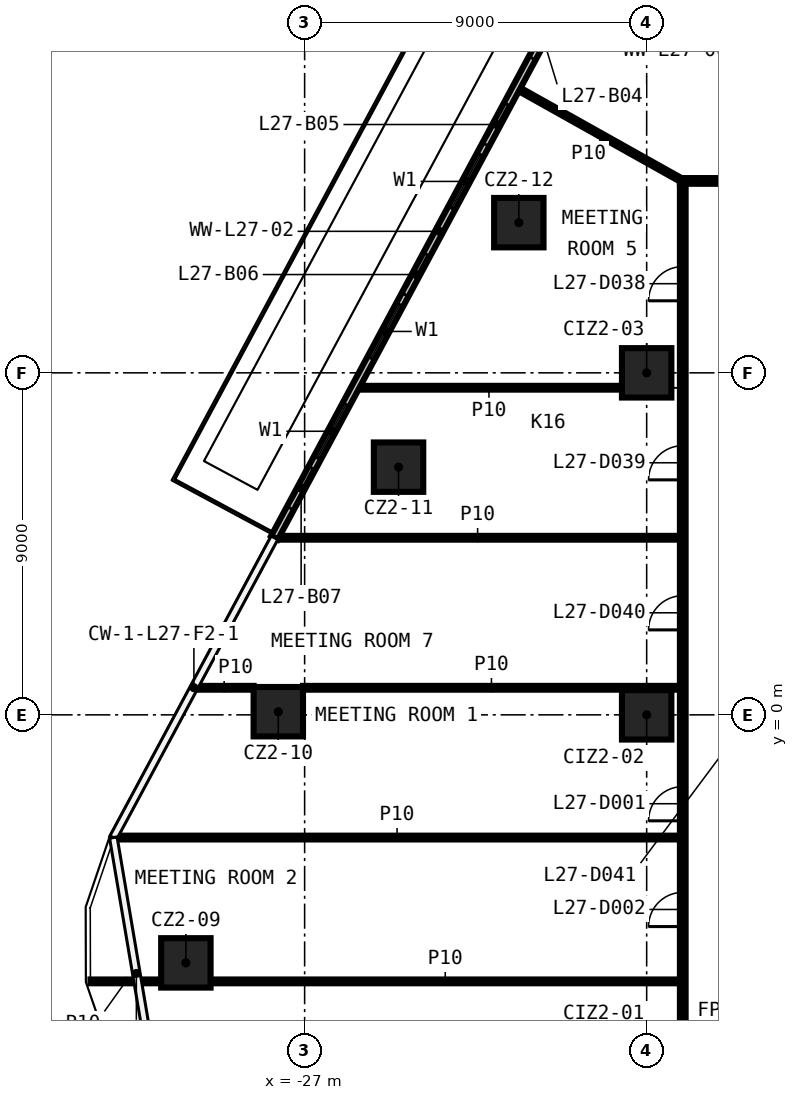
"""IFC4 building model, lengths in metres.
Left out: names, types, materials, properties, quantities, classifications, styles, units other than length and angle.
Written with IfcOpenShell. Run it as: python <this file> out.ifc"""

import sys

from ifc_helpers import new_model, si_unit, direction, frame, frame_2d, origin, origin_2d, place, context, subcontext, project, spatial, rectangle, extrude, element, fill, save


model = new_model("IFC4")
c1 = context("Model", 3, precision=1e-05, world=origin(), true_north=direction((0.0, 1.0)))
c2 = subcontext(c1, "Body", "Model", "MODEL_VIEW")
j1 = project(units=[si_unit("LENGTHUNIT", "METRE"), si_unit("PLANEANGLEUNIT", "RADIAN")], contexts=[c1])
p1 = place(None, origin())
s1 = spatial("IfcSite", under=j1, at=p1, CompositionType="ELEMENT")
p2 = place(p1, origin())
s2 = spatial("IfcBuilding", under=s1, at=p2, CompositionType="ELEMENT")
p3 = place(p2, frame((0.0, 0.0, 124.8)))
s3 = spatial("IfcBuildingStorey", under=s2, at=p3, CompositionType="ELEMENT", Elevation=124.8)
for number, where, z_axis, x_axis in (
    (1, (-30.125, -6.527, 0.0), (0.0, 0.0, 1.0), (1.0, 0.0, 0.0)),
    (2, (-27.693, 0.083, 0.0), (0.0, 0.0, 1.0), (1.0, 0.0, 0.0)),
    (3, (-24.529, 6.518, 0.0), (0.0, 0.0, 1.0), (1.0, 0.0, 0.0)),
    (4, (-21.364, 12.952, 0.0), (0.0, 0.0, 1.0), (1.0, 0.0, 0.0)),
    (5, (-18.0, 0.0, 0.0), (0.0, 0.0, 1.0), (1.0, 0.0, 0.0)),
    (6, (-18.0, 9.0, 0.0), (0.0, 0.0, 1.0), (1.0, 0.0, 0.0)),
):
    element("IfcColumn", number, at=place(p3, frame(where, z_axis=z_axis, x_axis=x_axis)), inside=s3, PredefinedType="COLUMN", context=c2, shape_type="SweptSolid", body=[
        extrude(rectangle(XDim=1.3, YDim=1.3, at=origin_2d()), origin(), (0.0, 0.0, 1.0), 3.3),
    ])
p4 = place(p3, frame((-32.635, -7.014, 0.0), z_axis=(0.0, 0.0, 1.0), x_axis=(1.0, 0.0, 0.0)))
e7 = element("IfcWall", 7, at=p4, inside=s3, PredefinedType="PARTITIONING", context=c2, shape_type="SweptSolid", body=[
    extrude(rectangle(XDim=1.86, YDim=0.1, at=frame_2d((0.93, 0.0))), origin(), (0.0, 0.0, 1.0), 3.3),
])
p5 = place(p3, frame((-29.475, -7.014, 0.0), z_axis=(0.0, 0.0, 1.0), x_axis=(1.0, 0.0, 0.0)))
e8 = element("IfcWall", 8, at=p5, inside=s3, PredefinedType="PARTITIONING", context=c2, shape_type="SweptSolid", body=[
    extrude(rectangle(XDim=12.35, YDim=0.1, at=frame_2d((6.175, 0.0))), origin(), (0.0, 0.0, 1.0), 3.3),
])
p6 = place(p3, frame((-32.011, -3.229, 0.0), z_axis=(0.0, 0.0, 1.0), x_axis=(1.0, 0.0, 0.0)))
e9 = element("IfcWall", 9, at=p6, inside=s3, PredefinedType="PARTITIONING", context=c2, shape_type="SweptSolid", body=[
    extrude(rectangle(XDim=14.886, YDim=0.1, at=frame_2d((7.443, 0.0))), origin(), (0.0, 0.0, 1.0), 3.3),
])
p7 = place(p3, frame((-29.893, 0.712, 0.0), z_axis=(0.0, 0.0, 1.0), x_axis=(1.0, 0.0, 0.0)))
e10 = element("IfcWall", 10, at=p7, inside=s3, PredefinedType="PARTITIONING", context=c2, shape_type="SweptSolid", body=[
    extrude(rectangle(XDim=1.55, YDim=0.1, at=frame_2d((0.775, 0.0))), origin(), (0.0, 0.0, 1.0), 3.3),
])
p8 = place(p3, frame((-27.043, 0.712, 0.0), z_axis=(0.0, 0.0, 1.0), x_axis=(1.0, 0.0, 0.0)))
e11 = element("IfcWall", 11, at=p8, inside=s3, PredefinedType="PARTITIONING", context=c2, shape_type="SweptSolid", body=[
    extrude(rectangle(XDim=9.918, YDim=0.1, at=frame_2d((4.959, 0.0))), origin(), (0.0, 0.0, 1.0), 3.3),
])
p9 = place(p3, frame((-27.771, 4.66, 0.0), z_axis=(0.0, 0.0, 1.0), x_axis=(1.0, 0.0, 0.0)))
e12 = element("IfcWall", 12, at=p9, inside=s3, PredefinedType="PARTITIONING", context=c2, shape_type="SweptSolid", body=[
    extrude(rectangle(XDim=10.646, YDim=0.1, at=frame_2d((5.323, 0.0))), origin(), (0.0, 0.0, 1.0), 3.3),
])
p10 = place(p3, frame((-25.649, 8.608, 0.0), z_axis=(0.0, 0.0, 1.0), x_axis=(1.0, 0.0, 0.0)))
e13 = element("IfcWall", 13, at=p10, inside=s3, PredefinedType="PARTITIONING", context=c2, shape_type="SweptSolid", body=[
    extrude(rectangle(XDim=6.999, YDim=0.1, at=frame_2d((3.5, 0.0))), origin(), (0.0, 0.0, 1.0), 3.3),
])
p11 = place(p3, frame((-17.125, 14.05, 0.0), z_axis=(0.0, 0.0, 1.0), x_axis=(1.0, 0.0, 0.0)))
e14 = element("IfcWall", 14, at=p11, inside=s3, PredefinedType="PARTITIONING", context=c2, shape_type="SweptSolid", body=[
    extrude(rectangle(XDim=34.25, YDim=0.15, at=frame_2d((17.125, 0.0))), origin(), (0.0, 0.0, 1.0), 3.3),
])
p12 = place(p11, frame((30.377, 0.0, 0.0)))
e15 = element("IfcOpeningElement", 15, at=p12, cuts=e14, PredefinedType="OPENING", context=c2, shape_type="SweptSolid", body=[
    extrude(rectangle(XDim=0.9, YDim=2.1, at=frame_2d((0.45, 1.05))), frame((0.0, 0.085, 0.0), z_axis=(0.0, -1.0, 0.0), x_axis=(1.0, 0.0, 0.0)), (0.0, 0.0, 1.0), 0.17),
])
p13 = place(p11, frame((23.321, 0.0, 0.0)))
e16 = element("IfcOpeningElement", 16, at=p13, cuts=e14, PredefinedType="OPENING", context=c2, shape_type="SweptSolid", body=[
    extrude(rectangle(XDim=1.0, YDim=2.1, at=frame_2d((0.5, 1.05))), frame((0.0, 0.085, 0.0), z_axis=(0.0, -1.0, 0.0), x_axis=(1.0, 0.0, 0.0)), (0.0, 0.0, 1.0), 0.17),
])
p14 = place(p11, frame((21.183, 0.0, 0.0)))
e17 = element("IfcOpeningElement", 17, at=p14, cuts=e14, PredefinedType="OPENING", context=c2, shape_type="SweptSolid", body=[
    extrude(rectangle(XDim=1.0, YDim=2.1, at=frame_2d((0.5, 1.05))), frame((0.0, 0.085, 0.0), z_axis=(0.0, -1.0, 0.0), x_axis=(1.0, 0.0, 0.0)), (0.0, 0.0, 1.0), 0.17),
])
p15 = place(p11, frame((14.241, 0.0, 0.0)))
e18 = element("IfcOpeningElement", 18, at=p15, cuts=e14, PredefinedType="OPENING", context=c2, shape_type="SweptSolid", body=[
    extrude(rectangle(XDim=1.0, YDim=2.1, at=frame_2d((0.5, 1.05))), frame((0.0, 0.085, 0.0), z_axis=(0.0, -1.0, 0.0), x_axis=(1.0, 0.0, 0.0)), (0.0, 0.0, 1.0), 0.17),
])
p16 = place(p11, frame((12.099, 0.0, 0.0)))
e19 = element("IfcOpeningElement", 19, at=p16, cuts=e14, PredefinedType="OPENING", context=c2, shape_type="SweptSolid", body=[
    extrude(rectangle(XDim=1.0, YDim=2.1, at=frame_2d((0.5, 1.05))), frame((0.0, 0.085, 0.0), z_axis=(0.0, -1.0, 0.0), x_axis=(1.0, 0.0, 0.0)), (0.0, 0.0, 1.0), 0.17),
])
p17 = place(p11, frame((5.161, 0.0, 0.0)))
e20 = element("IfcOpeningElement", 20, at=p17, cuts=e14, PredefinedType="OPENING", context=c2, shape_type="SweptSolid", body=[
    extrude(rectangle(XDim=1.0, YDim=2.1, at=frame_2d((0.5, 1.05))), frame((0.0, 0.085, 0.0), z_axis=(0.0, -1.0, 0.0), x_axis=(1.0, 0.0, 0.0)), (0.0, 0.0, 1.0), 0.17),
])
p18 = place(p11, frame((2.406, 0.0, 0.0)))
e21 = element("IfcOpeningElement", 21, at=p18, cuts=e14, PredefinedType="OPENING", context=c2, shape_type="SweptSolid", body=[
    extrude(rectangle(XDim=0.9, YDim=2.1, at=frame_2d((0.45, 1.05))), frame((0.0, 0.085, 0.0), z_axis=(0.0, -1.0, 0.0), x_axis=(1.0, 0.0, 0.0)), (0.0, 0.0, 1.0), 0.17),
])
p19 = place(p3, frame((-17.05, -13.975, 0.0), z_axis=(0.0, 0.0, 1.0), x_axis=(0.0, 1.0, 0.0)))
e22 = element("IfcWall", 22, at=p19, inside=s3, PredefinedType="PARTITIONING", context=c2, shape_type="SweptSolid", body=[
    extrude(rectangle(XDim=27.95, YDim=0.15, at=frame_2d((13.975, 0.0))), origin(), (0.0, 0.0, 1.0), 3.3),
])
p20 = place(p19, frame((11.186, 0.0, 0.0)))
e23 = element("IfcOpeningElement", 23, at=p20, cuts=e22, PredefinedType="OPENING", context=c2, shape_type="SweptSolid", body=[
    extrude(rectangle(XDim=0.9, YDim=2.1, at=frame_2d((0.45, 1.05))), frame((0.0, 0.085, 0.0), z_axis=(0.0, -1.0, 0.0), x_axis=(1.0, 0.0, 0.0)), (0.0, 0.0, 1.0), 0.17),
])
p21 = place(p19, frame((8.404, 0.0, 0.0)))
e24 = element("IfcOpeningElement", 24, at=p21, cuts=e22, PredefinedType="OPENING", context=c2, shape_type="SweptSolid", body=[
    extrude(rectangle(XDim=0.9, YDim=2.1, at=frame_2d((0.45, 1.05))), frame((0.0, 0.085, 0.0), z_axis=(0.0, -1.0, 0.0), x_axis=(1.0, 0.0, 0.0)), (0.0, 0.0, 1.0), 0.17),
])
p22 = place(p19, frame((1.58, 0.0, 0.0)))
e25 = element("IfcOpeningElement", 25, at=p22, cuts=e22, PredefinedType="OPENING", context=c2, shape_type="SweptSolid", body=[
    extrude(rectangle(XDim=0.9, YDim=2.1, at=frame_2d((0.45, 1.05))), frame((0.0, 0.085, 0.0), z_axis=(0.0, -1.0, 0.0), x_axis=(1.0, 0.0, 0.0)), (0.0, 0.0, 1.0), 0.17),
])
p23 = place(p19, frame((24.871, 0.0, 0.0)))
e26 = element("IfcOpeningElement", 26, at=p23, cuts=e22, PredefinedType="OPENING", context=c2, shape_type="SweptSolid", body=[
    extrude(rectangle(XDim=0.9, YDim=2.1, at=frame_2d((0.45, 1.05))), frame((0.0, 0.085, 0.0), z_axis=(0.0, -1.0, 0.0), x_axis=(1.0, 0.0, 0.0)), (0.0, 0.0, 1.0), 0.17),
])
p24 = place(p19, frame((20.159, 0.0, 0.0)))
e27 = element("IfcOpeningElement", 27, at=p24, cuts=e22, PredefinedType="OPENING", context=c2, shape_type="SweptSolid", body=[
    extrude(rectangle(XDim=0.9, YDim=2.1, at=frame_2d((0.45, 1.05))), frame((0.0, 0.085, 0.0), z_axis=(0.0, -1.0, 0.0), x_axis=(1.0, 0.0, 0.0)), (0.0, 0.0, 1.0), 0.17),
])
p25 = place(p19, frame((16.211, 0.0, 0.0)))
e28 = element("IfcOpeningElement", 28, at=p25, cuts=e22, PredefinedType="OPENING", context=c2, shape_type="SweptSolid", body=[
    extrude(rectangle(XDim=0.9, YDim=2.1, at=frame_2d((0.45, 1.05))), frame((0.0, 0.085, 0.0), z_axis=(0.0, -1.0, 0.0), x_axis=(1.0, 0.0, 0.0)), (0.0, 0.0, 1.0), 0.17),
])
p26 = place(p3, frame((-21.411, 16.494, 0.0), z_axis=(0.0, 0.0, 1.0), x_axis=(0.872342728858, -0.488894838803, 0.0)))
e29 = element("IfcWall", 29, at=p26, inside=s3, PredefinedType="PARTITIONING", context=c2, shape_type="SweptSolid", body=[
    extrude(rectangle(XDim=4.999, YDim=0.1, at=frame_2d((2.5, 0.0))), origin(), (0.0, 0.0, 1.0), 3.3),
])
p27 = place(p3, frame((-19.306, 20.451, 0.0), z_axis=(0.0, 0.0, 1.0), x_axis=(-0.473410228211, -0.880842072011, 0.0)))
e30 = element("IfcWall", 30, at=p27, inside=s3, PredefinedType="SOLIDWALL", context=c2, shape_type="SweptSolid", body=[
    extrude(rectangle(XDim=17.928, YDim=0.2, at=frame_2d((8.964, 0.0))), origin(), (0.0, 0.0, 1.0), 3.3),
])
p28 = place(p27, frame((0.5, 0.0, 0.6)))
e31 = element("IfcOpeningElement", 31, at=p28, cuts=e30, PredefinedType="OPENING", context=c2, shape_type="SweptSolid", body=[
    extrude(rectangle(XDim=1.6, YDim=2.4, at=frame_2d((0.8, 1.2))), frame((0.0, 0.11, 0.0), z_axis=(0.0, -1.0, 0.0), x_axis=(1.0, 0.0, 0.0)), (0.0, 0.0, 1.0), 0.22),
])
p29 = place(p27, frame((2.4, 0.0, 0.0)))
e32 = element("IfcOpeningElement", 32, at=p29, cuts=e30, PredefinedType="OPENING", context=c2, shape_type="SweptSolid", body=[
    extrude(rectangle(XDim=1.2, YDim=2.4, at=frame_2d((0.6, 1.2))), frame((0.0, 0.11, 0.0), z_axis=(0.0, -1.0, 0.0), x_axis=(1.0, 0.0, 0.0)), (0.0, 0.0, 1.0), 0.22),
])
p30 = place(p27, frame((6.482, 0.0, 0.6)))
e33 = element("IfcOpeningElement", 33, at=p30, cuts=e30, PredefinedType="OPENING", context=c2, shape_type="SweptSolid", body=[
    extrude(rectangle(XDim=1.6, YDim=2.4, at=frame_2d((0.8, 1.2))), frame((0.0, 0.11, 0.0), z_axis=(0.0, -1.0, 0.0), x_axis=(1.0, 0.0, 0.0)), (0.0, 0.0, 1.0), 0.22),
])
p31 = place(p27, frame((4.982, 0.0, 0.0)))
e34 = element("IfcOpeningElement", 34, at=p31, cuts=e30, PredefinedType="OPENING", context=c2, shape_type="SweptSolid", body=[
    extrude(rectangle(XDim=1.2, YDim=2.4, at=frame_2d((0.6, 1.2))), frame((0.0, 0.11, 0.0), z_axis=(0.0, -1.0, 0.0), x_axis=(1.0, 0.0, 0.0)), (0.0, 0.0, 1.0), 0.22),
])
p32 = place(p27, frame((10.964, 0.0, 0.6)))
e35 = element("IfcOpeningElement", 35, at=p32, cuts=e30, PredefinedType="OPENING", context=c2, shape_type="SweptSolid", body=[
    extrude(rectangle(XDim=1.6, YDim=2.4, at=frame_2d((0.8, 1.2))), frame((0.0, 0.11, 0.0), z_axis=(0.0, -1.0, 0.0), x_axis=(1.0, 0.0, 0.0)), (0.0, 0.0, 1.0), 0.22),
])
p33 = place(p27, frame((9.464, 0.0, 0.0)))
e36 = element("IfcOpeningElement", 36, at=p33, cuts=e30, PredefinedType="OPENING", context=c2, shape_type="SweptSolid", body=[
    extrude(rectangle(XDim=1.2, YDim=2.4, at=frame_2d((0.6, 1.2))), frame((0.0, 0.11, 0.0), z_axis=(0.0, -1.0, 0.0), x_axis=(1.0, 0.0, 0.0)), (0.0, 0.0, 1.0), 0.22),
])
p34 = place(p27, frame((13.946, 0.0, 0.6)))
e37 = element("IfcOpeningElement", 37, at=p34, cuts=e30, PredefinedType="OPENING", context=c2, shape_type="SweptSolid", body=[
    extrude(rectangle(XDim=1.6, YDim=2.4, at=frame_2d((0.8, 1.2))), frame((0.0, 0.11, 0.0), z_axis=(0.0, -1.0, 0.0), x_axis=(1.0, 0.0, 0.0)), (0.0, 0.0, 1.0), 0.22),
])
p35 = place(p27, frame((15.846, 0.0, 0.0)))
e38 = element("IfcOpeningElement", 38, at=p35, cuts=e30, PredefinedType="OPENING", context=c2, shape_type="SweptSolid", body=[
    extrude(rectangle(XDim=1.2, YDim=2.4, at=frame_2d((0.6, 1.2))), frame((0.0, 0.11, 0.0), z_axis=(0.0, -1.0, 0.0), x_axis=(1.0, 0.0, 0.0)), (0.0, 0.0, 1.0), 0.22),
])
p36 = place(p20, origin())
e39 = element("IfcDoor", 39, at=p36, inside=s3, OperationType="SINGLE_SWING_RIGHT", PredefinedType="DOOR", context=c2, shape_type="SweptSolid", body=[
    extrude(rectangle(XDim=0.9, YDim=2.1, at=frame_2d((0.45, 1.05))), frame((0.0, 0.025, 0.0), z_axis=(0.0, -1.0, 0.0), x_axis=(1.0, 0.0, 0.0)), (0.0, 0.0, 1.0), 0.05),
])
fill(e23, e39)
p37 = place(p21, origin())
e40 = element("IfcDoor", 40, at=p37, inside=s3, OperationType="SINGLE_SWING_LEFT", PredefinedType="DOOR", context=c2, shape_type="SweptSolid", body=[
    extrude(rectangle(XDim=0.9, YDim=2.1, at=frame_2d((0.45, 1.05))), frame((0.0, 0.025, 0.0), z_axis=(0.0, -1.0, 0.0), x_axis=(1.0, 0.0, 0.0)), (0.0, 0.0, 1.0), 0.05),
])
fill(e24, e40)
p38 = place(p23, origin())
e41 = element("IfcDoor", 41, at=p38, inside=s3, OperationType="SINGLE_SWING_RIGHT", PredefinedType="DOOR", context=c2, shape_type="SweptSolid", body=[
    extrude(rectangle(XDim=0.9, YDim=2.1, at=frame_2d((0.45, 1.05))), frame((0.0, 0.025, 0.0), z_axis=(0.0, -1.0, 0.0), x_axis=(1.0, 0.0, 0.0)), (0.0, 0.0, 1.0), 0.05),
])
fill(e26, e41)
p39 = place(p24, origin())
e42 = element("IfcDoor", 42, at=p39, inside=s3, OperationType="SINGLE_SWING_LEFT", PredefinedType="DOOR", context=c2, shape_type="SweptSolid", body=[
    extrude(rectangle(XDim=0.9, YDim=2.1, at=frame_2d((0.45, 1.05))), frame((0.0, 0.025, 0.0), z_axis=(0.0, -1.0, 0.0), x_axis=(1.0, 0.0, 0.0)), (0.0, 0.0, 1.0), 0.05),
])
fill(e27, e42)
p40 = place(p25, origin())
e43 = element("IfcDoor", 43, at=p40, inside=s3, OperationType="SINGLE_SWING_RIGHT", PredefinedType="DOOR", context=c2, shape_type="SweptSolid", body=[
    extrude(rectangle(XDim=0.9, YDim=2.1, at=frame_2d((0.45, 1.05))), frame((0.0, 0.025, 0.0), z_axis=(0.0, -1.0, 0.0), x_axis=(1.0, 0.0, 0.0)), (0.0, 0.0, 1.0), 0.05),
])
fill(e28, e43)
p41 = place(p29, origin())
e44 = element("IfcDoor", 44, at=p41, inside=s3, OperationType="SLIDING_TO_LEFT", PredefinedType="DOOR", context=c2, shape_type="SweptSolid", body=[
    extrude(rectangle(XDim=1.2, YDim=2.4, at=frame_2d((0.6, 1.2))), frame((0.0, 0.025, 0.0), z_axis=(0.0, -1.0, 0.0), x_axis=(1.0, 0.0, 0.0)), (0.0, 0.0, 1.0), 0.05),
])
fill(e32, e44)
p42 = place(p30, origin())
e45 = element("IfcWindow", 45, at=p42, inside=s3, PartitioningType="SINGLE_PANEL", PredefinedType="WINDOW", context=c2, shape_type="SweptSolid", body=[
    extrude(rectangle(XDim=1.6, YDim=2.4, at=frame_2d((0.8, 1.2))), frame((0.0, 0.03, 0.0), z_axis=(0.0, -1.0, 0.0), x_axis=(1.0, 0.0, 0.0)), (0.0, 0.0, 1.0), 0.06),
])
fill(e33, e45)
p43 = place(p31, origin())
e46 = element("IfcDoor", 46, at=p43, inside=s3, OperationType="SLIDING_TO_LEFT", PredefinedType="DOOR", context=c2, shape_type="SweptSolid", body=[
    extrude(rectangle(XDim=1.2, YDim=2.4, at=frame_2d((0.6, 1.2))), frame((0.0, 0.025, 0.0), z_axis=(0.0, -1.0, 0.0), x_axis=(1.0, 0.0, 0.0)), (0.0, 0.0, 1.0), 0.05),
])
fill(e34, e46)
p44 = place(p32, origin())
e47 = element("IfcWindow", 47, at=p44, inside=s3, PartitioningType="SINGLE_PANEL", PredefinedType="WINDOW", context=c2, shape_type="SweptSolid", body=[
    extrude(rectangle(XDim=1.6, YDim=2.4, at=frame_2d((0.8, 1.2))), frame((0.0, 0.03, 0.0), z_axis=(0.0, -1.0, 0.0), x_axis=(1.0, 0.0, 0.0)), (0.0, 0.0, 1.0), 0.06),
])
fill(e35, e47)
p45 = place(p33, origin())
e48 = element("IfcDoor", 48, at=p45, inside=s3, OperationType="SLIDING_TO_LEFT", PredefinedType="DOOR", context=c2, shape_type="SweptSolid", body=[
    extrude(rectangle(XDim=1.2, YDim=2.4, at=frame_2d((0.6, 1.2))), frame((0.0, 0.025, 0.0), z_axis=(0.0, -1.0, 0.0), x_axis=(1.0, 0.0, 0.0)), (0.0, 0.0, 1.0), 0.05),
])
fill(e36, e48)
p46 = place(p34, origin())
e49 = element("IfcWindow", 49, at=p46, inside=s3, PartitioningType="SINGLE_PANEL", PredefinedType="WINDOW", context=c2, shape_type="SweptSolid", body=[
    extrude(rectangle(XDim=1.6, YDim=2.4, at=frame_2d((0.8, 1.2))), frame((0.0, 0.03, 0.0), z_axis=(0.0, -1.0, 0.0), x_axis=(1.0, 0.0, 0.0)), (0.0, 0.0, 1.0), 0.06),
])
fill(e37, e49)
p47 = place(p35, origin())
e50 = element("IfcDoor", 50, at=p47, inside=s3, OperationType="SLIDING_TO_LEFT", PredefinedType="DOOR", context=c2, shape_type="SweptSolid", body=[
    extrude(rectangle(XDim=1.2, YDim=2.4, at=frame_2d((0.6, 1.2))), frame((0.0, 0.025, 0.0), z_axis=(0.0, -1.0, 0.0), x_axis=(1.0, 0.0, 0.0)), (0.0, 0.0, 1.0), 0.05),
])
fill(e38, e50)
save(model, sys.argv[1])
